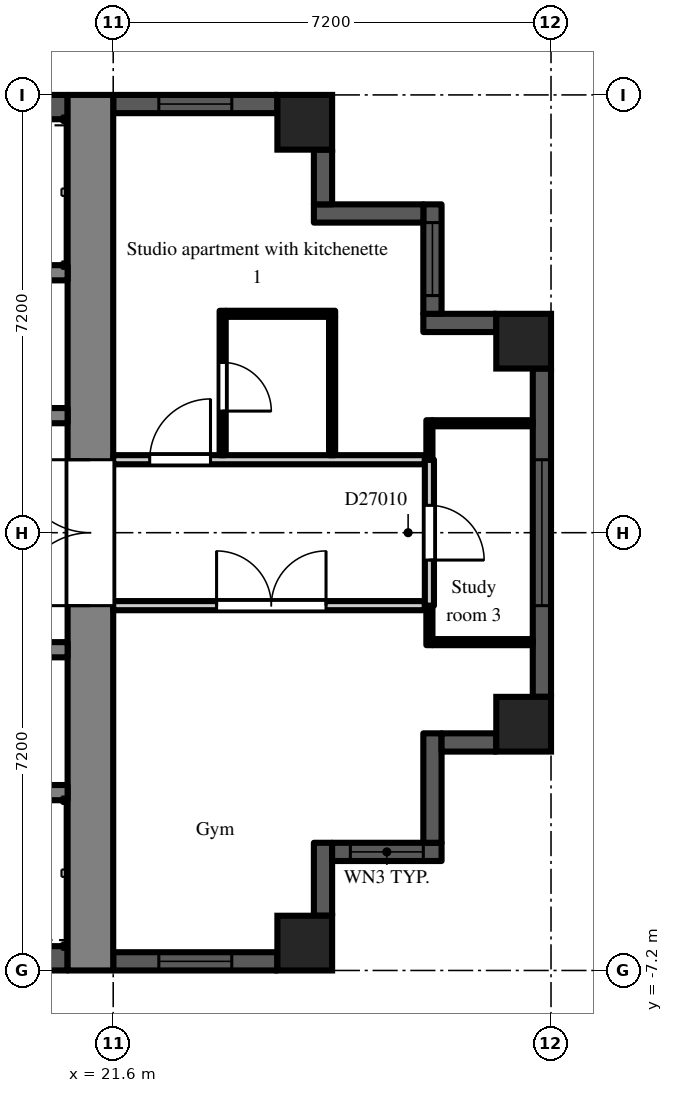
"""IFC4 building model, lengths in metres.
Left out: names, types, materials, properties, quantities, classifications, styles, units other than length and angle.
Written with IfcOpenShell. Run it as: python <this file> out.ifc"""

import sys

from ifc_helpers import new_model, si_unit, direction, frame, frame_2d, origin, origin_2d, place, context, subcontext, project, spatial, rectangle, extrude, element, fill, save


model = new_model("IFC4")
c1 = context("Model", 3, precision=1e-05, world=origin(), true_north=direction((0.0, 1.0)))
c2 = subcontext(c1, "Body", "Model", "MODEL_VIEW")
j1 = project(units=[si_unit("LENGTHUNIT", "METRE"), si_unit("PLANEANGLEUNIT", "RADIAN")], contexts=[c1])
p1 = place(None, origin())
s1 = spatial("IfcSite", under=j1, at=p1, CompositionType="ELEMENT")
p2 = place(p1, origin())
s2 = spatial("IfcBuilding", under=s1, at=p2, CompositionType="ELEMENT")
p3 = place(p2, frame((0.0, 0.0, 191.7)))
s3 = spatial("IfcBuildingStorey", under=s2, at=p3, CompositionType="ELEMENT", Elevation=191.7)
for number, where, z_axis, x_axis in (
    (1, (24.75, -6.75, 0.0), (0.0, 0.0, 1.0), (1.0, 0.0, 0.0)),
    (2, (24.75, 6.75, 0.0), (0.0, 0.0, 1.0), (1.0, 0.0, 0.0)),
    (3, (28.35, -3.15, 0.0), (0.0, 0.0, 1.0), (1.0, 0.0, 0.0)),
    (4, (28.35, 3.15, 0.0), (0.0, 0.0, 1.0), (1.0, 0.0, 0.0)),
):
    element("IfcColumn", number, at=place(p3, frame(where, z_axis=z_axis, x_axis=x_axis)), inside=s3, PredefinedType="COLUMN", context=c2, shape_type="SweptSolid", body=[
        extrude(rectangle(XDim=0.9, YDim=0.9, at=origin_2d()), origin(), (0.0, 0.0, 1.0), 3.0),
    ])
p4 = place(p3, frame((21.6, -7.05, 0.0), z_axis=(0.0, 0.0, 1.0), x_axis=(1.0, 0.0, 0.0)))
e5 = element("IfcWall", 5, at=p4, inside=s3, PredefinedType="SOLIDWALL", context=c2, shape_type="SweptSolid", body=[
    extrude(rectangle(XDim=2.7, YDim=0.3, at=frame_2d((1.35, 0.0))), origin(), (0.0, 0.0, 1.0), 2.3),
])
p5 = place(p4, frame((0.75, 0.0, 0.2)))
e6 = element("IfcOpeningElement", 6, at=p5, cuts=e5, PredefinedType="OPENING", context=c2, shape_type="SweptSolid", body=[
    extrude(rectangle(XDim=1.2, YDim=1.85, at=frame_2d((0.6, 0.925))), frame((0.0, 0.16, 0.0), z_axis=(0.0, -1.0, 0.0), x_axis=(1.0, 0.0, 0.0)), (0.0, 0.0, 1.0), 0.32),
])
p6 = place(p3, frame((25.05, -6.3, 0.0), z_axis=(0.0, 0.0, 1.0), x_axis=(0.0, 1.0, 0.0)))
e7 = element("IfcWall", 7, at=p6, inside=s3, PredefinedType="SOLIDWALL", context=c2, shape_type="SweptSolid", body=[
    extrude(rectangle(XDim=1.2, YDim=0.3, at=frame_2d((0.6, 0.0))), origin(), (0.0, 0.0, 1.0), 2.55),
])
p7 = place(p3, frame((25.2, -5.25, 0.0), z_axis=(0.0, 0.0, 1.0), x_axis=(1.0, 0.0, 0.0)))
e8 = element("IfcWall", 8, at=p7, inside=s3, PredefinedType="SOLIDWALL", context=c2, shape_type="SweptSolid", body=[
    extrude(rectangle(XDim=1.8, YDim=0.3, at=frame_2d((0.9, 0.0))), origin(), (0.0, 0.0, 1.0), 2.55),
])
p8 = place(p7, frame((0.3, 0.0, 0.2)))
e9 = element("IfcOpeningElement", 9, at=p8, cuts=e8, PredefinedType="OPENING", context=c2, shape_type="SweptSolid", body=[
    extrude(rectangle(XDim=1.2, YDim=1.85, at=frame_2d((0.6, 0.925))), frame((0.0, 0.16, 0.0), z_axis=(0.0, -1.0, 0.0), x_axis=(1.0, 0.0, 0.0)), (0.0, 0.0, 1.0), 0.32),
])
p9 = place(p3, frame((26.85, -5.1, 0.0), z_axis=(0.0, 0.0, 1.0), x_axis=(0.0, 1.0, 0.0)))
e10 = element("IfcWall", 10, at=p9, inside=s3, PredefinedType="SOLIDWALL", context=c2, shape_type="SweptSolid", body=[
    extrude(rectangle(XDim=1.8, YDim=0.3, at=frame_2d((0.9, 0.0))), origin(), (0.0, 0.0, 1.0), 2.55),
])
p10 = place(p3, frame((27.0, -3.45, 0.0), z_axis=(0.0, 0.0, 1.0), x_axis=(1.0, 0.0, 0.0)))
e11 = element("IfcWall", 11, at=p10, inside=s3, PredefinedType="SOLIDWALL", context=c2, shape_type="SweptSolid", body=[
    extrude(rectangle(XDim=0.9, YDim=0.3, at=frame_2d((0.45, 0.0))), origin(), (0.0, 0.0, 1.0), 2.55),
])
p11 = place(p3, frame((28.65, -2.7, 0.0), z_axis=(0.0, 0.0, 1.0), x_axis=(0.0, 1.0, 0.0)))
e12 = element("IfcWall", 12, at=p11, inside=s3, PredefinedType="SOLIDWALL", context=c2, shape_type="SweptSolid", body=[
    extrude(rectangle(XDim=5.4, YDim=0.3, at=frame_2d((2.7, 0.0))), origin(), (0.0, 0.0, 1.0), 2.3),
])
p12 = place(p11, frame((1.5, 0.0, 0.2)))
e13 = element("IfcOpeningElement", 13, at=p12, cuts=e12, PredefinedType="OPENING", context=c2, shape_type="SweptSolid", body=[
    extrude(rectangle(XDim=2.4, YDim=1.85, at=frame_2d((1.2, 0.925))), frame((0.0, 0.16, 0.0), z_axis=(0.0, -1.0, 0.0), x_axis=(1.0, 0.0, 0.0)), (0.0, 0.0, 1.0), 0.32),
])
p13 = place(p3, frame((27.9, 3.45, 0.0), z_axis=(0.0, 0.0, 1.0), x_axis=(-1.0, 0.0, 0.0)))
e14 = element("IfcWall", 14, at=p13, inside=s3, PredefinedType="SOLIDWALL", context=c2, shape_type="SweptSolid", body=[
    extrude(rectangle(XDim=1.2, YDim=0.3, at=frame_2d((0.6, 0.0))), origin(), (0.0, 0.0, 1.0), 2.55),
])
p14 = place(p3, frame((26.85, 3.6, 0.0), z_axis=(0.0, 0.0, 1.0), x_axis=(0.0, 1.0, 0.0)))
e15 = element("IfcWall", 15, at=p14, inside=s3, PredefinedType="SOLIDWALL", context=c2, shape_type="SweptSolid", body=[
    extrude(rectangle(XDim=1.8, YDim=0.3, at=frame_2d((0.9, 0.0))), origin(), (0.0, 0.0, 1.0), 2.55),
])
p15 = place(p14, frame((0.3, 0.0, 0.2)))
e16 = element("IfcOpeningElement", 16, at=p15, cuts=e15, PredefinedType="OPENING", context=c2, shape_type="SweptSolid", body=[
    extrude(rectangle(XDim=1.2, YDim=1.85, at=frame_2d((0.6, 0.925))), frame((0.0, 0.16, 0.0), z_axis=(0.0, -1.0, 0.0), x_axis=(1.0, 0.0, 0.0)), (0.0, 0.0, 1.0), 0.32),
])
p16 = place(p3, frame((26.7, 5.25, 0.0), z_axis=(0.0, 0.0, 1.0), x_axis=(-1.0, 0.0, 0.0)))
e17 = element("IfcWall", 17, at=p16, inside=s3, PredefinedType="SOLIDWALL", context=c2, shape_type="SweptSolid", body=[
    extrude(rectangle(XDim=1.8, YDim=0.3, at=frame_2d((0.9, 0.0))), origin(), (0.0, 0.0, 1.0), 2.55),
])
p17 = place(p3, frame((25.05, 5.4, 0.0), z_axis=(0.0, 0.0, 1.0), x_axis=(0.0, 1.0, 0.0)))
e18 = element("IfcWall", 18, at=p17, inside=s3, PredefinedType="SOLIDWALL", context=c2, shape_type="SweptSolid", body=[
    extrude(rectangle(XDim=0.9, YDim=0.3, at=frame_2d((0.45, 0.0))), origin(), (0.0, 0.0, 1.0), 2.55),
])
p18 = place(p3, frame((24.3, 7.05, 0.0), z_axis=(0.0, 0.0, 1.0), x_axis=(-1.0, 0.0, 0.0)))
e19 = element("IfcWall", 19, at=p18, inside=s3, PredefinedType="SOLIDWALL", context=c2, shape_type="SweptSolid", body=[
    extrude(rectangle(XDim=2.7, YDim=0.3, at=frame_2d((1.35, 0.0))), origin(), (0.0, 0.0, 1.0), 2.3),
])
p19 = place(p18, frame((0.75, 0.0, 0.2)))
e20 = element("IfcOpeningElement", 20, at=p19, cuts=e19, PredefinedType="OPENING", context=c2, shape_type="SweptSolid", body=[
    extrude(rectangle(XDim=1.2, YDim=1.85, at=frame_2d((0.6, 0.925))), frame((0.0, 0.16, 0.0), z_axis=(0.0, -1.0, 0.0), x_axis=(1.0, 0.0, 0.0)), (0.0, 0.0, 1.0), 0.32),
])
p20 = place(p3, frame((21.225, -7.2, 0.0), z_axis=(0.0, 0.0, 1.0), x_axis=(0.0, 1.0, 0.0)))
e21 = element("IfcWall", 21, at=p20, inside=s3, PredefinedType="SHEAR", context=c2, shape_type="SweptSolid", body=[
    extrude(rectangle(XDim=14.4, YDim=0.75, at=frame_2d((7.2, 0.0))), origin(), (0.0, 0.0, 1.0), 2.55),
])
p21 = place(p20, frame((6.0, 0.0, 0.0)))
e22 = element("IfcOpeningElement", 22, at=p21, cuts=e21, PredefinedType="OPENING", context=c2, shape_type="SweptSolid", body=[
    extrude(rectangle(XDim=2.4, YDim=2.2, at=frame_2d((1.2, 1.1))), frame((0.0, 0.385, 0.0), z_axis=(0.0, -1.0, 0.0), x_axis=(1.0, 0.0, 0.0)), (0.0, 0.0, 1.0), 0.77),
])
p22 = place(p3, frame((7.9, 7.0, 0.0), z_axis=(0.0, 0.0, 1.0), x_axis=(1.0, 0.0, 0.0)))
e23 = element("IfcWall", 23, at=p22, inside=s3, PredefinedType="SHEAR", context=c2, shape_type="SweptSolid", body=[
    extrude(rectangle(XDim=12.95, YDim=0.4, at=frame_2d((6.475, 0.0))), origin(), (0.0, 0.0, 1.0), 2.55),
])
p23 = place(p3, frame((7.9, 1.925, 0.0), z_axis=(0.0, 0.0, 1.0), x_axis=(1.0, 0.0, 0.0)))
e24 = element("IfcWall", 24, at=p23, inside=s3, PredefinedType="SHEAR", context=c2, shape_type="SweptSolid", body=[
    extrude(rectangle(XDim=12.95, YDim=0.25, at=frame_2d((6.475, 0.0))), origin(), (0.0, 0.0, 1.0), 2.55),
])
p24 = place(p23, frame((4.825, 0.0, 0.0)))
e25 = element("IfcOpeningElement", 25, at=p24, cuts=e24, PredefinedType="OPENING", context=c2, shape_type="SweptSolid", body=[
    extrude(rectangle(XDim=1.1, YDim=2.1, at=frame_2d((0.55, 1.05))), frame((0.0, 0.135, 0.0), z_axis=(0.0, -1.0, 0.0), x_axis=(1.0, 0.0, 0.0)), (0.0, 0.0, 1.0), 0.27),
])
p25 = place(p23, frame((7.025, 0.0, 0.0)))
e26 = element("IfcOpeningElement", 26, at=p25, cuts=e24, PredefinedType="OPENING", context=c2, shape_type="SweptSolid", body=[
    extrude(rectangle(XDim=1.1, YDim=2.1, at=frame_2d((0.55, 1.05))), frame((0.0, 0.135, 0.0), z_axis=(0.0, -1.0, 0.0), x_axis=(1.0, 0.0, 0.0)), (0.0, 0.0, 1.0), 0.27),
])
p26 = place(p23, frame((9.225, 0.0, 0.0)))
e27 = element("IfcOpeningElement", 27, at=p26, cuts=e24, PredefinedType="OPENING", context=c2, shape_type="SweptSolid", body=[
    extrude(rectangle(XDim=1.1, YDim=2.1, at=frame_2d((0.55, 1.05))), frame((0.0, 0.135, 0.0), z_axis=(0.0, -1.0, 0.0), x_axis=(1.0, 0.0, 0.0)), (0.0, 0.0, 1.0), 0.27),
])
p27 = place(p23, frame((0.525, 0.0, 0.0)))
e28 = element("IfcOpeningElement", 28, at=p27, cuts=e24, PredefinedType="OPENING", context=c2, shape_type="SweptSolid", body=[
    extrude(rectangle(XDim=0.9, YDim=2.1, at=frame_2d((0.45, 1.05))), frame((0.0, 0.135, 0.0), z_axis=(0.0, -1.0, 0.0), x_axis=(1.0, 0.0, 0.0)), (0.0, 0.0, 1.0), 0.27),
])
p28 = place(p23, frame((2.625, 0.0, 0.0)))
e29 = element("IfcOpeningElement", 29, at=p28, cuts=e24, PredefinedType="OPENING", context=c2, shape_type="SweptSolid", body=[
    extrude(rectangle(XDim=1.1, YDim=2.1, at=frame_2d((0.55, 1.05))), frame((0.0, 0.135, 0.0), z_axis=(0.0, -1.0, 0.0), x_axis=(1.0, 0.0, 0.0)), (0.0, 0.0, 1.0), 0.27),
])
p29 = place(p23, frame((11.525, 0.0, 0.0)))
e30 = element("IfcOpeningElement", 30, at=p29, cuts=e24, PredefinedType="OPENING", context=c2, shape_type="SweptSolid", body=[
    extrude(rectangle(XDim=0.9, YDim=2.1, at=frame_2d((0.45, 1.05))), frame((0.0, 0.135, 0.0), z_axis=(0.0, -1.0, 0.0), x_axis=(1.0, 0.0, 0.0)), (0.0, 0.0, 1.0), 0.27),
])
p30 = place(p3, frame((12.3, 4.275, 0.0), z_axis=(0.0, 0.0, 1.0), x_axis=(1.0, 0.0, 0.0)))
e31 = element("IfcWall", 31, at=p30, inside=s3, PredefinedType="SHEAR", context=c2, shape_type="SweptSolid", body=[
    extrude(rectangle(XDim=8.55, YDim=0.25, at=frame_2d((4.275, 0.0))), origin(), (0.0, 0.0, 1.0), 2.55),
])
p31 = place(p3, frame((7.9, -7.0, 0.0), z_axis=(0.0, 0.0, 1.0), x_axis=(1.0, 0.0, 0.0)))
e32 = element("IfcWall", 32, at=p31, inside=s3, PredefinedType="SHEAR", context=c2, shape_type="SweptSolid", body=[
    extrude(rectangle(XDim=12.95, YDim=0.4, at=frame_2d((6.475, 0.0))), origin(), (0.0, 0.0, 1.0), 2.55),
])
p32 = place(p3, frame((7.9, -1.925, 0.0), z_axis=(0.0, 0.0, 1.0), x_axis=(1.0, 0.0, 0.0)))
e33 = element("IfcWall", 33, at=p32, inside=s3, PredefinedType="SHEAR", context=c2, shape_type="SweptSolid", body=[
    extrude(rectangle(XDim=12.95, YDim=0.25, at=frame_2d((6.475, 0.0))), origin(), (0.0, 0.0, 1.0), 2.55),
])
p33 = place(p32, frame((0.525, 0.0, 0.0)))
e34 = element("IfcOpeningElement", 34, at=p33, cuts=e33, PredefinedType="OPENING", context=c2, shape_type="SweptSolid", body=[
    extrude(rectangle(XDim=0.9, YDim=2.1, at=frame_2d((0.45, 1.05))), frame((0.0, 0.135, 0.0), z_axis=(0.0, -1.0, 0.0), x_axis=(1.0, 0.0, 0.0)), (0.0, 0.0, 1.0), 0.27),
])
p34 = place(p32, frame((2.625, 0.0, 0.0)))
e35 = element("IfcOpeningElement", 35, at=p34, cuts=e33, PredefinedType="OPENING", context=c2, shape_type="SweptSolid", body=[
    extrude(rectangle(XDim=1.1, YDim=2.1, at=frame_2d((0.55, 1.05))), frame((0.0, 0.135, 0.0), z_axis=(0.0, -1.0, 0.0), x_axis=(1.0, 0.0, 0.0)), (0.0, 0.0, 1.0), 0.27),
])
p35 = place(p32, frame((8.225, 0.0, 0.0)))
e36 = element("IfcOpeningElement", 36, at=p35, cuts=e33, PredefinedType="OPENING", context=c2, shape_type="SweptSolid", body=[
    extrude(rectangle(XDim=0.9, YDim=2.1, at=frame_2d((0.45, 1.05))), frame((0.0, 0.135, 0.0), z_axis=(0.0, -1.0, 0.0), x_axis=(1.0, 0.0, 0.0)), (0.0, 0.0, 1.0), 0.27),
])
p36 = place(p3, frame((12.3, -4.275, 0.0), z_axis=(0.0, 0.0, 1.0), x_axis=(1.0, 0.0, 0.0)))
e37 = element("IfcWall", 37, at=p36, inside=s3, PredefinedType="SHEAR", context=c2, shape_type="SweptSolid", body=[
    extrude(rectangle(XDim=8.55, YDim=0.25, at=frame_2d((4.275, 0.0))), origin(), (0.0, 0.0, 1.0), 2.55),
])
p37 = place(p3, frame((21.6, -1.2, 0.0), z_axis=(0.0, 0.0, 1.0), x_axis=(1.0, 0.0, 0.0)))
e38 = element("IfcWall", 38, at=p37, inside=s3, PredefinedType="PARTITIONING", context=c2, shape_type="SweptSolid", body=[
    extrude(rectangle(XDim=5.125, YDim=0.15, at=frame_2d((2.562, 0.0))), origin(), (0.0, 0.0, 1.0), 2.55),
])
p38 = place(p37, frame((1.7, 0.0, 0.0)))
e39 = element("IfcOpeningElement", 39, at=p38, cuts=e38, PredefinedType="OPENING", context=c2, shape_type="SweptSolid", body=[
    extrude(rectangle(XDim=1.8, YDim=2.1, at=frame_2d((0.9, 1.05))), frame((0.0, 0.085, 0.0), z_axis=(0.0, -1.0, 0.0), x_axis=(1.0, 0.0, 0.0)), (0.0, 0.0, 1.0), 0.17),
])
p39 = place(p3, frame((21.6, 1.2, 0.0), z_axis=(0.0, 0.0, 1.0), x_axis=(1.0, 0.0, 0.0)))
e40 = element("IfcWall", 40, at=p39, inside=s3, PredefinedType="PARTITIONING", context=c2, shape_type="SweptSolid", body=[
    extrude(rectangle(XDim=5.125, YDim=0.15, at=frame_2d((2.562, 0.0))), origin(), (0.0, 0.0, 1.0), 2.55),
])
p40 = place(p39, frame((0.6, 0.0, 0.0)))
e41 = element("IfcOpeningElement", 41, at=p40, cuts=e40, PredefinedType="OPENING", context=c2, shape_type="SweptSolid", body=[
    extrude(rectangle(XDim=1.0, YDim=2.1, at=frame_2d((0.5, 1.05))), frame((0.0, 0.085, 0.0), z_axis=(0.0, -1.0, 0.0), x_axis=(1.0, 0.0, 0.0)), (0.0, 0.0, 1.0), 0.17),
])
p41 = place(p3, frame((23.4, 1.275, 0.0), z_axis=(0.0, 0.0, 1.0), x_axis=(0.0, 1.0, 0.0)))
e42 = element("IfcWall", 42, at=p41, inside=s3, PredefinedType="PARTITIONING", context=c2, shape_type="SweptSolid", body=[
    extrude(rectangle(XDim=2.375, YDim=0.1, at=frame_2d((1.188, 0.0))), origin(), (0.0, 0.0, 1.0), 2.55),
])
p42 = place(p41, frame((0.725, 0.0, 0.0)))
e43 = element("IfcOpeningElement", 43, at=p42, cuts=e42, PredefinedType="OPENING", context=c2, shape_type="SweptSolid", body=[
    extrude(rectangle(XDim=0.8, YDim=2.1, at=frame_2d((0.4, 1.05))), frame((0.0, 0.06, 0.0), z_axis=(0.0, -1.0, 0.0), x_axis=(1.0, 0.0, 0.0)), (0.0, 0.0, 1.0), 0.12),
])
p43 = place(p3, frame((23.45, 3.6, 0.0), z_axis=(0.0, 0.0, 1.0), x_axis=(1.0, 0.0, 0.0)))
e44 = element("IfcWall", 44, at=p43, inside=s3, PredefinedType="PARTITIONING", context=c2, shape_type="SweptSolid", body=[
    extrude(rectangle(XDim=1.8, YDim=0.1, at=frame_2d((0.9, 0.0))), origin(), (0.0, 0.0, 1.0), 2.55),
])
p44 = place(p3, frame((25.2, 1.275, 0.0), z_axis=(0.0, 0.0, 1.0), x_axis=(0.0, 1.0, 0.0)))
e45 = element("IfcWall", 45, at=p44, inside=s3, PredefinedType="PARTITIONING", context=c2, shape_type="SweptSolid", body=[
    extrude(rectangle(XDim=2.275, YDim=0.1, at=frame_2d((1.138, 0.0))), origin(), (0.0, 0.0, 1.0), 2.55),
])
p45 = place(p3, frame((26.8, -1.85, 0.0), z_axis=(0.0, 0.0, 1.0), x_axis=(0.0, 1.0, 0.0)))
e46 = element("IfcWall", 46, at=p45, inside=s3, PredefinedType="PARTITIONING", context=c2, shape_type="SweptSolid", body=[
    extrude(rectangle(XDim=0.65, YDim=0.1, at=frame_2d((0.325, 0.0))), origin(), (0.0, 0.0, 1.0), 2.55),
])
p46 = place(p3, frame((26.85, -1.8, 0.0), z_axis=(0.0, 0.0, 1.0), x_axis=(1.0, 0.0, 0.0)))
e47 = element("IfcWall", 47, at=p46, inside=s3, PredefinedType="PARTITIONING", context=c2, shape_type="SweptSolid", body=[
    extrude(rectangle(XDim=1.65, YDim=0.1, at=frame_2d((0.825, 0.0))), origin(), (0.0, 0.0, 1.0), 2.55),
])
p47 = place(p3, frame((26.8, -1.2, 0.0), z_axis=(0.0, 0.0, 1.0), x_axis=(0.0, 1.0, 0.0)))
e48 = element("IfcWall", 48, at=p47, inside=s3, PredefinedType="PARTITIONING", context=c2, shape_type="SweptSolid", body=[
    extrude(rectangle(XDim=2.4, YDim=0.15, at=frame_2d((1.2, 0.0))), origin(), (0.0, 0.0, 1.0), 2.55),
])
p48 = place(p47, frame((0.75, 0.0, 0.0)))
e49 = element("IfcOpeningElement", 49, at=p48, cuts=e48, PredefinedType="OPENING", context=c2, shape_type="SweptSolid", body=[
    extrude(rectangle(XDim=0.9, YDim=2.1, at=frame_2d((0.45, 1.05))), frame((0.0, 0.085, 0.0), z_axis=(0.0, -1.0, 0.0), x_axis=(1.0, 0.0, 0.0)), (0.0, 0.0, 1.0), 0.17),
])
p49 = place(p3, frame((26.8, 1.2, 0.0), z_axis=(0.0, 0.0, 1.0), x_axis=(0.0, 1.0, 0.0)))
e50 = element("IfcWall", 50, at=p49, inside=s3, PredefinedType="PARTITIONING", context=c2, shape_type="SweptSolid", body=[
    extrude(rectangle(XDim=0.65, YDim=0.1, at=frame_2d((0.325, 0.0))), origin(), (0.0, 0.0, 1.0), 2.55),
])
p50 = place(p3, frame((26.85, 1.8, 0.0), z_axis=(0.0, 0.0, 1.0), x_axis=(1.0, 0.0, 0.0)))
e51 = element("IfcWall", 51, at=p50, inside=s3, PredefinedType="PARTITIONING", context=c2, shape_type="SweptSolid", body=[
    extrude(rectangle(XDim=1.65, YDim=0.1, at=frame_2d((0.825, 0.0))), origin(), (0.0, 0.0, 1.0), 2.55),
])
p51 = place(p5, origin())
e52 = element("IfcWindow", 52, at=p51, inside=s3, PartitioningType="SINGLE_PANEL", PredefinedType="WINDOW", context=c2, shape_type="SweptSolid", body=[
    extrude(rectangle(XDim=1.2, YDim=1.85, at=frame_2d((0.6, 0.925))), frame((0.0, 0.03, 0.0), z_axis=(0.0, -1.0, 0.0), x_axis=(1.0, 0.0, 0.0)), (0.0, 0.0, 1.0), 0.06),
])
fill(e6, e52)
p52 = place(p8, origin())
e53 = element("IfcWindow", 53, at=p52, inside=s3, PartitioningType="SINGLE_PANEL", PredefinedType="WINDOW", context=c2, shape_type="SweptSolid", body=[
    extrude(rectangle(XDim=1.2, YDim=1.85, at=frame_2d((0.6, 0.925))), frame((0.0, 0.03, 0.0), z_axis=(0.0, -1.0, 0.0), x_axis=(1.0, 0.0, 0.0)), (0.0, 0.0, 1.0), 0.06),
])
fill(e9, e53)
p53 = place(p12, origin())
e54 = element("IfcWindow", 54, at=p53, inside=s3, PartitioningType="SINGLE_PANEL", PredefinedType="WINDOW", context=c2, shape_type="SweptSolid", body=[
    extrude(rectangle(XDim=2.4, YDim=1.85, at=frame_2d((1.2, 0.925))), frame((0.0, 0.03, 0.0), z_axis=(0.0, -1.0, 0.0), x_axis=(1.0, 0.0, 0.0)), (0.0, 0.0, 1.0), 0.06),
])
fill(e13, e54)
p54 = place(p15, origin())
e55 = element("IfcWindow", 55, at=p54, inside=s3, PartitioningType="SINGLE_PANEL", PredefinedType="WINDOW", context=c2, shape_type="SweptSolid", body=[
    extrude(rectangle(XDim=1.2, YDim=1.85, at=frame_2d((0.6, 0.925))), frame((0.0, 0.03, 0.0), z_axis=(0.0, -1.0, 0.0), x_axis=(1.0, 0.0, 0.0)), (0.0, 0.0, 1.0), 0.06),
])
fill(e16, e55)
p55 = place(p19, origin())
e56 = element("IfcWindow", 56, at=p55, inside=s3, PartitioningType="SINGLE_PANEL", PredefinedType="WINDOW", context=c2, shape_type="SweptSolid", body=[
    extrude(rectangle(XDim=1.2, YDim=1.85, at=frame_2d((0.6, 0.925))), frame((0.0, 0.03, 0.0), z_axis=(0.0, -1.0, 0.0), x_axis=(1.0, 0.0, 0.0)), (0.0, 0.0, 1.0), 0.06),
])
fill(e20, e56)
p56 = place(p21, origin())
e57 = element("IfcDoor", 57, at=p56, inside=s3, OperationType="DOUBLE_DOOR_DOUBLE_SWING", PredefinedType="DOOR", context=c2, shape_type="SweptSolid", body=[
    extrude(rectangle(XDim=2.4, YDim=2.2, at=frame_2d((1.2, 1.1))), frame((0.0, 0.025, 0.0), z_axis=(0.0, -1.0, 0.0), x_axis=(1.0, 0.0, 0.0)), (0.0, 0.0, 1.0), 0.05),
])
fill(e22, e57)
p57 = place(p48, frame((0.9, 0.0, 0.0), z_axis=(0.0, 0.0, 1.0), x_axis=(-1.0, 0.0, 0.0)))
e58 = element("IfcDoor", 58, at=p57, inside=s3, OperationType="SINGLE_SWING_RIGHT", PredefinedType="DOOR", context=c2, shape_type="SweptSolid", body=[
    extrude(rectangle(XDim=0.9, YDim=2.1, at=frame_2d((0.45, 1.05))), frame((0.0, 0.025, 0.0), z_axis=(0.0, -1.0, 0.0), x_axis=(1.0, 0.0, 0.0)), (0.0, 0.0, 1.0), 0.05),
])
fill(e49, e58)
p58 = place(p42, frame((0.8, 0.0, 0.0), z_axis=(0.0, 0.0, 1.0), x_axis=(-1.0, 0.0, 0.0)))
e59 = element("IfcDoor", 59, at=p58, inside=s3, OperationType="SINGLE_SWING_RIGHT", PredefinedType="DOOR", context=c2, shape_type="SweptSolid", body=[
    extrude(rectangle(XDim=0.8, YDim=2.1, at=frame_2d((0.4, 1.05))), frame((0.0, 0.025, 0.0), z_axis=(0.0, -1.0, 0.0), x_axis=(1.0, 0.0, 0.0)), (0.0, 0.0, 1.0), 0.05),
])
fill(e43, e59)
p59 = place(p40, origin())
e60 = element("IfcDoor", 60, at=p59, inside=s3, OperationType="SINGLE_SWING_RIGHT", PredefinedType="DOOR", context=c2, shape_type="SweptSolid", body=[
    extrude(rectangle(XDim=1.0, YDim=2.1, at=frame_2d((0.5, 1.05))), frame((0.0, 0.025, 0.0), z_axis=(0.0, -1.0, 0.0), x_axis=(1.0, 0.0, 0.0)), (0.0, 0.0, 1.0), 0.05),
])
fill(e41, e60)
p60 = place(p38, origin())
e61 = element("IfcDoor", 61, at=p60, inside=s3, OperationType="DOUBLE_DOOR_DOUBLE_SWING", PredefinedType="DOOR", context=c2, shape_type="SweptSolid", body=[
    extrude(rectangle(XDim=1.8, YDim=2.1, at=frame_2d((0.9, 1.05))), frame((0.0, 0.025, 0.0), z_axis=(0.0, -1.0, 0.0), x_axis=(1.0, 0.0, 0.0)), (0.0, 0.0, 1.0), 0.05),
])
fill(e39, e61)
save(model, sys.argv[1])
